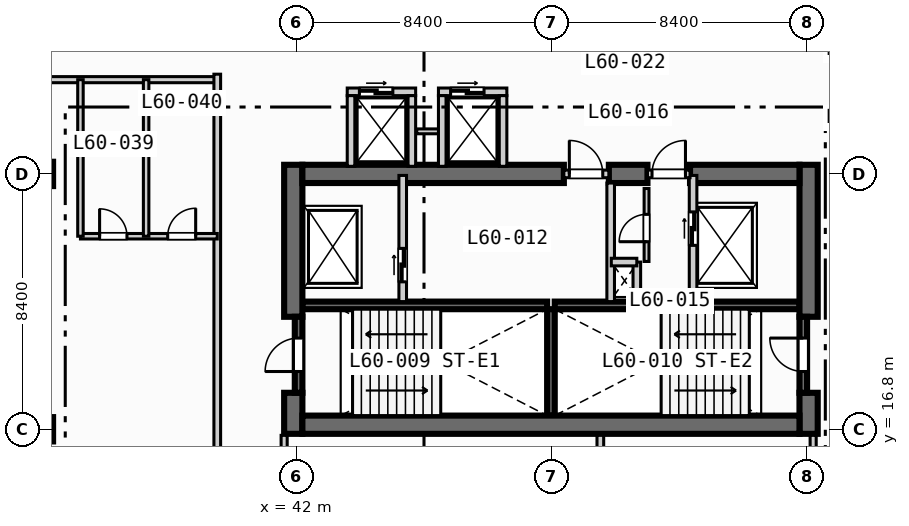
"""IFC4 building model, lengths in metres.
Left out: names, types, materials, properties, quantities, classifications, styles, units other than length and angle.
Written with IfcOpenShell. Run it as: python <this file> out.ifc"""

import sys

from ifc_helpers import new_model, si_unit, direction, frame, frame_2d, origin, origin_2d, place, context, subcontext, project, spatial, rectangle, extrude, element, fill, save


model = new_model("IFC4")
c1 = context("Model", 3, precision=1e-05, world=origin(), true_north=direction((0.0, 1.0)))
c2 = subcontext(c1, "Body", "Model", "MODEL_VIEW")
j1 = project(units=[si_unit("LENGTHUNIT", "METRE"), si_unit("PLANEANGLEUNIT", "RADIAN")], contexts=[c1])
p1 = place(None, origin())
s1 = spatial("IfcSite", under=j1, at=p1, CompositionType="ELEMENT")
p2 = place(p1, origin())
s2 = spatial("IfcBuilding", under=s1, at=p2, CompositionType="ELEMENT")
p3 = place(p2, frame((0.0, 0.0, 245.3)))
s3 = spatial("IfcBuildingStorey", under=s2, at=p3, CompositionType="ELEMENT", Elevation=245.3)
for number, where, z_axis, x_axis in (
    (1, (42.2, 20.875, 0.0), (0.0, 0.0, 1.0), (1.0, 0.0, 0.0)),
    (2, (50.5, 20.875, 0.0), (0.0, 0.0, 1.0), (1.0, 0.0, 0.0)),
):
    element("IfcWall", number, at=place(p3, frame(where, z_axis=z_axis, x_axis=x_axis)), inside=s3, PredefinedType="SOLIDWALL", context=c2, shape_type="SweptSolid", body=[
        extrude(rectangle(XDim=8.05, YDim=0.25, at=frame_2d((4.025, 0.0))), origin(), (0.0, 0.0, 1.0), 3.47),
    ])
p4 = place(p3, frame((50.375, 17.25, 0.0), z_axis=(0.0, 0.0, 1.0), x_axis=(0.0, 1.0, 0.0)))
e3 = element("IfcWall", 3, at=p4, inside=s3, PredefinedType="SOLIDWALL", context=c2, shape_type="SweptSolid", body=[
    extrude(rectangle(XDim=3.5, YDim=0.25, at=frame_2d((1.75, 0.0))), origin(), (0.0, 0.0, 1.0), 3.47),
])
p5 = place(p3, frame((41.9, 16.65, 0.0), z_axis=(0.0, 0.0, 1.0), x_axis=(0.0, 1.0, 0.0)))
e4 = element("IfcWall", 4, at=p5, inside=s3, PredefinedType="SHEAR", context=c2, shape_type="SweptSolid", body=[
    extrude(rectangle(XDim=1.35, YDim=0.6, at=frame_2d((0.675, 0.0))), origin(), (0.0, 0.0, 1.0), 3.47),
])
p6 = place(p3, frame((41.9, 20.5, 0.0), z_axis=(0.0, 0.0, 1.0), x_axis=(0.0, 1.0, 0.0)))
e5 = element("IfcWall", 5, at=p6, inside=s3, PredefinedType="SHEAR", context=c2, shape_type="SweptSolid", body=[
    extrude(rectangle(XDim=5.0, YDim=0.6, at=frame_2d((2.5, 0.0))), origin(), (0.0, 0.0, 1.0), 3.47),
])
p7 = place(p3, frame((58.85, 16.65, 0.0), z_axis=(0.0, 0.0, 1.0), x_axis=(0.0, 1.0, 0.0)))
e6 = element("IfcWall", 6, at=p7, inside=s3, PredefinedType="SHEAR", context=c2, shape_type="SweptSolid", body=[
    extrude(rectangle(XDim=1.35, YDim=0.6, at=frame_2d((0.675, 0.0))), origin(), (0.0, 0.0, 1.0), 3.47),
])
p8 = place(p3, frame((58.85, 20.5, 0.0), z_axis=(0.0, 0.0, 1.0), x_axis=(0.0, 1.0, 0.0)))
e7 = element("IfcWall", 7, at=p8, inside=s3, PredefinedType="SHEAR", context=c2, shape_type="SweptSolid", body=[
    extrude(rectangle(XDim=5.0, YDim=0.6, at=frame_2d((2.5, 0.0))), origin(), (0.0, 0.0, 1.0), 3.47),
])
p9 = place(p3, frame((42.2, 16.95, 0.0), z_axis=(0.0, 0.0, 1.0), x_axis=(1.0, 0.0, 0.0)))
e8 = element("IfcWall", 8, at=p9, inside=s3, PredefinedType="SHEAR", context=c2, shape_type="SweptSolid", body=[
    extrude(rectangle(XDim=16.35, YDim=0.6, at=frame_2d((8.175, 0.0))), origin(), (0.0, 0.0, 1.0), 3.47),
])
p10 = place(p3, frame((42.2, 25.2, 0.0), z_axis=(0.0, 0.0, 1.0), x_axis=(1.0, 0.0, 0.0)))
e9 = element("IfcWall", 9, at=p10, inside=s3, PredefinedType="SHEAR", context=c2, shape_type="SweptSolid", body=[
    extrude(rectangle(XDim=8.6, YDim=0.6, at=frame_2d((4.3, 0.0))), origin(), (0.0, 0.0, 1.0), 3.47),
])
p11 = place(p3, frame((52.28, 25.2, 0.0), z_axis=(0.0, 0.0, 1.0), x_axis=(1.0, 0.0, 0.0)))
e10 = element("IfcWall", 10, at=p11, inside=s3, PredefinedType="SHEAR", context=c2, shape_type="SweptSolid", body=[
    extrude(rectangle(XDim=1.27, YDim=0.6, at=frame_2d((0.635, 0.0))), origin(), (0.0, 0.0, 1.0), 3.47),
])
p12 = place(p3, frame((54.95, 25.2, 0.0), z_axis=(0.0, 0.0, 1.0), x_axis=(1.0, 0.0, 0.0)))
e11 = element("IfcWall", 11, at=p12, inside=s3, PredefinedType="SHEAR", context=c2, shape_type="SweptSolid", body=[
    extrude(rectangle(XDim=3.6, YDim=0.6, at=frame_2d((1.8, 0.0))), origin(), (0.0, 0.0, 1.0), 3.47),
])
for number, where, z_axis, x_axis in (
    (12, (33.6, 16.8, 0.0), (0.0, 0.0, 1.0), (1.0, 0.0, 0.0)),
    (13, (33.6, 25.2, 0.0), (0.0, 0.0, 1.0), (1.0, 0.0, 0.0)),
):
    element("IfcColumn", number, at=place(p3, frame(where, z_axis=z_axis, x_axis=x_axis)), inside=s3, PredefinedType="COLUMN", context=c2, shape_type="SweptSolid", body=[
        extrude(rectangle(XDim=0.8, YDim=0.8, at=origin_2d()), origin(), (0.0, 0.0, 1.0), 3.7),
    ])
p13 = place(p3, frame((42.075, 18.0, 0.0), z_axis=(0.0, 0.0, 1.0), x_axis=(0.0, 1.0, 0.0)))
e14 = element("IfcWall", 14, at=p13, inside=s3, PredefinedType="SOLIDWALL", context=c2, shape_type="SweptSolid", body=[
    extrude(rectangle(XDim=2.5, YDim=0.25, at=frame_2d((1.25, 0.0))), origin(), (0.0, 0.0, 1.0), 3.47),
])
p14 = place(p13, frame((0.7, 0.0, 0.0)))
e15 = element("IfcOpeningElement", 15, at=p14, cuts=e14, PredefinedType="OPENING", context=c2, shape_type="SweptSolid", body=[
    extrude(rectangle(XDim=1.1, YDim=2.15, at=frame_2d((0.55, 1.075))), frame((0.0, 0.135, 0.0), z_axis=(0.0, -1.0, 0.0), x_axis=(1.0, 0.0, 0.0)), (0.0, 0.0, 1.0), 0.27),
])
p15 = place(p3, frame((58.675, 18.0, 0.0), z_axis=(0.0, 0.0, 1.0), x_axis=(0.0, 1.0, 0.0)))
e16 = element("IfcWall", 16, at=p15, inside=s3, PredefinedType="SOLIDWALL", context=c2, shape_type="SweptSolid", body=[
    extrude(rectangle(XDim=2.5, YDim=0.25, at=frame_2d((1.25, 0.0))), origin(), (0.0, 0.0, 1.0), 3.47),
])
p16 = place(p15, frame((0.7, 0.0, 0.0)))
e17 = element("IfcOpeningElement", 17, at=p16, cuts=e16, PredefinedType="OPENING", context=c2, shape_type="SweptSolid", body=[
    extrude(rectangle(XDim=1.1, YDim=2.15, at=frame_2d((0.55, 1.075))), frame((0.0, 0.135, 0.0), z_axis=(0.0, -1.0, 0.0), x_axis=(1.0, 0.0, 0.0)), (0.0, 0.0, 1.0), 0.27),
])
p17 = place(p3, frame((45.5, 21.0, 0.0), z_axis=(0.0, 0.0, 1.0), x_axis=(0.0, 1.0, 0.0)))
e18 = element("IfcWall", 18, at=p17, inside=s3, PredefinedType="SOLIDWALL", context=c2, shape_type="SweptSolid", body=[
    extrude(rectangle(XDim=4.15, YDim=0.25, at=frame_2d((2.075, 0.0))), origin(), (0.0, 0.0, 1.0), 3.47),
])
p18 = place(p17, frame((0.65, 0.0, 0.0)))
e19 = element("IfcOpeningElement", 19, at=p18, cuts=e18, PredefinedType="OPENING", context=c2, shape_type="SweptSolid", body=[
    extrude(rectangle(XDim=1.1, YDim=2.15, at=frame_2d((0.55, 1.075))), frame((0.0, 0.135, 0.0), z_axis=(0.0, -1.0, 0.0), x_axis=(1.0, 0.0, 0.0)), (0.0, 0.0, 1.0), 0.27),
])
p19 = place(p3, frame((50.8, 25.2, 0.0), z_axis=(0.0, 0.0, 1.0), x_axis=(1.0, 0.0, 0.0)))
e20 = element("IfcWall", 20, at=p19, inside=s3, PredefinedType="SOLIDWALL", context=c2, shape_type="SweptSolid", body=[
    extrude(rectangle(XDim=1.48, YDim=0.25, at=frame_2d((0.74, 0.0))), origin(), (0.0, 0.0, 1.0), 3.47),
])
p20 = place(p19, frame((0.18, 0.0, 0.0)))
e21 = element("IfcOpeningElement", 21, at=p20, cuts=e20, PredefinedType="OPENING", context=c2, shape_type="SweptSolid", body=[
    extrude(rectangle(XDim=1.1, YDim=2.15, at=frame_2d((0.55, 1.075))), frame((0.0, 0.135, 0.0), z_axis=(0.0, -1.0, 0.0), x_axis=(1.0, 0.0, 0.0)), (0.0, 0.0, 1.0), 0.27),
])
p21 = place(p3, frame((52.34, 21.0, 0.0), z_axis=(0.0, 0.0, 1.0), x_axis=(0.0, 1.0, 0.0)))
e22 = element("IfcWall", 22, at=p21, inside=s3, PredefinedType="SOLIDWALL", context=c2, shape_type="SweptSolid", body=[
    extrude(rectangle(XDim=3.9, YDim=0.25, at=frame_2d((1.95, 0.0))), origin(), (0.0, 0.0, 1.0), 3.47),
])
p22 = place(p3, frame((55.05, 21.0, 0.0), z_axis=(0.0, 0.0, 1.0), x_axis=(0.0, 1.0, 0.0)))
e23 = element("IfcWall", 23, at=p22, inside=s3, PredefinedType="SOLIDWALL", context=c2, shape_type="SweptSolid", body=[
    extrude(rectangle(XDim=4.15, YDim=0.25, at=frame_2d((2.075, 0.0))), origin(), (0.0, 0.0, 1.0), 3.47),
])
p23 = place(p22, frame((1.85, 0.0, 0.0)))
e24 = element("IfcOpeningElement", 24, at=p23, cuts=e23, PredefinedType="OPENING", context=c2, shape_type="SweptSolid", body=[
    extrude(rectangle(XDim=1.1, YDim=2.15, at=frame_2d((0.55, 1.075))), frame((0.0, 0.135, 0.0), z_axis=(0.0, -1.0, 0.0), x_axis=(1.0, 0.0, 0.0)), (0.0, 0.0, 1.0), 0.27),
])
p24 = place(p3, frame((53.55, 25.2, 0.0), z_axis=(0.0, 0.0, 1.0), x_axis=(1.0, 0.0, 0.0)))
e25 = element("IfcWall", 25, at=p24, inside=s3, PredefinedType="SOLIDWALL", context=c2, shape_type="SweptSolid", body=[
    extrude(rectangle(XDim=1.4, YDim=0.25, at=frame_2d((0.7, 0.0))), origin(), (0.0, 0.0, 1.0), 3.47),
])
p25 = place(p24, frame((0.15, 0.0, 0.0)))
e26 = element("IfcOpeningElement", 26, at=p25, cuts=e25, PredefinedType="OPENING", context=c2, shape_type="SweptSolid", body=[
    extrude(rectangle(XDim=1.1, YDim=2.15, at=frame_2d((0.55, 1.075))), frame((0.0, 0.135, 0.0), z_axis=(0.0, -1.0, 0.0), x_axis=(1.0, 0.0, 0.0)), (0.0, 0.0, 1.0), 0.27),
])
p26 = place(p3, frame((53.2, 21.0, 0.0), z_axis=(0.0, 0.0, 1.0), x_axis=(0.0, 1.0, 0.0)))
e27 = element("IfcWall", 27, at=p26, inside=s3, PredefinedType="SOLIDWALL", context=c2, shape_type="SweptSolid", body=[
    extrude(rectangle(XDim=1.3, YDim=0.25, at=frame_2d((0.65, 0.0))), origin(), (0.0, 0.0, 1.0), 3.47),
])
p27 = place(p3, frame((52.36, 22.3, 0.0), z_axis=(0.0, 0.0, 1.0), x_axis=(1.0, 0.0, 0.0)))
e28 = element("IfcWall", 28, at=p27, inside=s3, PredefinedType="SOLIDWALL", context=c2, shape_type="SweptSolid", body=[
    extrude(rectangle(XDim=0.84, YDim=0.25, at=frame_2d((0.42, 0.0))), origin(), (0.0, 0.0, 1.0), 3.47),
])
p28 = place(p3, frame((53.52, 22.32, 0.0), z_axis=(0.0, 0.0, 1.0), x_axis=(0.0, 1.0, 0.0)))
e29 = element("IfcWall", 29, at=p28, inside=s3, PredefinedType="PARTITIONING", context=c2, shape_type="SweptSolid", body=[
    extrude(rectangle(XDim=2.4, YDim=0.16, at=frame_2d((1.2, 0.0))), origin(), (0.0, 0.0, 1.0), 3.47),
])
p29 = place(p28, frame((0.65, 0.0, 0.0)))
e30 = element("IfcOpeningElement", 30, at=p29, cuts=e29, PredefinedType="OPENING", context=c2, shape_type="SweptSolid", body=[
    extrude(rectangle(XDim=0.9, YDim=2.1, at=frame_2d((0.45, 1.05))), frame((0.0, 0.09, 0.0), z_axis=(0.0, -1.0, 0.0), x_axis=(1.0, 0.0, 0.0)), (0.0, 0.0, 1.0), 0.18),
])
p30 = place(p3, frame((43.675, 27.9, 0.0), z_axis=(0.0, 0.0, 1.0), x_axis=(1.0, 0.0, 0.0)))
e31 = element("IfcWall", 31, at=p30, inside=s3, PredefinedType="SOLIDWALL", context=c2, shape_type="SweptSolid", body=[
    extrude(rectangle(XDim=2.25, YDim=0.25, at=frame_2d((1.125, 0.0))), origin(), (0.0, 0.0, 1.0), 3.47),
])
p31 = place(p30, frame((0.4, 0.0, 0.0)))
e32 = element("IfcOpeningElement", 32, at=p31, cuts=e31, PredefinedType="OPENING", context=c2, shape_type="SweptSolid", body=[
    extrude(rectangle(XDim=1.1, YDim=2.15, at=frame_2d((0.55, 1.075))), frame((0.0, 0.135, 0.0), z_axis=(0.0, -1.0, 0.0), x_axis=(1.0, 0.0, 0.0)), (0.0, 0.0, 1.0), 0.27),
])
for number, where, z_axis, x_axis in (
    (33, (43.8, 25.45, 0.0), (0.0, 0.0, 1.0), (0.0, 1.0, 0.0)),
    (34, (45.8, 25.45, 0.0), (0.0, 0.0, 1.0), (0.0, 1.0, 0.0)),
):
    element("IfcWall", number, at=place(p3, frame(where, z_axis=z_axis, x_axis=x_axis)), inside=s3, PredefinedType="SOLIDWALL", context=c2, shape_type="SweptSolid", body=[
        extrude(rectangle(XDim=2.325, YDim=0.25, at=frame_2d((1.163, 0.0))), origin(), (0.0, 0.0, 1.0), 3.47),
    ])
p32 = place(p3, frame((45.96, 26.6, 0.0), z_axis=(0.0, 0.0, 1.0), x_axis=(1.0, 0.0, 0.0)))
e35 = element("IfcWall", 35, at=p32, inside=s3, PredefinedType="PARTITIONING", context=c2, shape_type="SweptSolid", body=[
    extrude(rectangle(XDim=0.88, YDim=0.16, at=frame_2d((0.44, 0.0))), origin(), (0.0, 0.0, 1.0), 3.47),
])
p33 = place(p3, frame((46.675, 27.9, 0.0), z_axis=(0.0, 0.0, 1.0), x_axis=(1.0, 0.0, 0.0)))
e36 = element("IfcWall", 36, at=p33, inside=s3, PredefinedType="SOLIDWALL", context=c2, shape_type="SweptSolid", body=[
    extrude(rectangle(XDim=2.25, YDim=0.25, at=frame_2d((1.125, 0.0))), origin(), (0.0, 0.0, 1.0), 3.47),
])
p34 = place(p33, frame((0.4, 0.0, 0.0)))
e37 = element("IfcOpeningElement", 37, at=p34, cuts=e36, PredefinedType="OPENING", context=c2, shape_type="SweptSolid", body=[
    extrude(rectangle(XDim=1.1, YDim=2.15, at=frame_2d((0.55, 1.075))), frame((0.0, 0.135, 0.0), z_axis=(0.0, -1.0, 0.0), x_axis=(1.0, 0.0, 0.0)), (0.0, 0.0, 1.0), 0.27),
])
for number, where, z_axis, x_axis in (
    (38, (46.8, 25.45, 0.0), (0.0, 0.0, 1.0), (0.0, 1.0, 0.0)),
    (39, (48.8, 25.45, 0.0), (0.0, 0.0, 1.0), (0.0, 1.0, 0.0)),
):
    element("IfcWall", number, at=place(p3, frame(where, z_axis=z_axis, x_axis=x_axis)), inside=s3, PredefinedType="SOLIDWALL", context=c2, shape_type="SweptSolid", body=[
        extrude(rectangle(XDim=2.325, YDim=0.25, at=frame_2d((1.163, 0.0))), origin(), (0.0, 0.0, 1.0), 3.47),
    ])
p35 = place(p3, frame((41.6, 8.65, 0.0), z_axis=(0.0, 0.0, 1.0), x_axis=(0.0, 1.0, 0.0)))
e40 = element("IfcWall", 40, at=p35, inside=s3, PredefinedType="PARTITIONING", context=c2, shape_type="SweptSolid", body=[
    extrude(rectangle(XDim=7.95, YDim=0.2, at=frame_2d((3.975, 0.0))), origin(), (0.0, 0.0, 1.0), 3.47),
])
p36 = place(p35, frame((2.2, 0.0, 0.0)))
e41 = element("IfcOpeningElement", 41, at=p36, cuts=e40, PredefinedType="OPENING", context=c2, shape_type="SweptSolid", body=[
    extrude(rectangle(XDim=0.92, YDim=2.1, at=frame_2d((0.46, 1.05))), frame((0.0, 0.11, 0.0), z_axis=(0.0, -1.0, 0.0), x_axis=(1.0, 0.0, 0.0)), (0.0, 0.0, 1.0), 0.22),
])
p37 = place(p3, frame((59.0, 8.65, 0.0), z_axis=(0.0, 0.0, 1.0), x_axis=(0.0, 1.0, 0.0)))
e42 = element("IfcWall", 42, at=p37, inside=s3, PredefinedType="PARTITIONING", context=c2, shape_type="SweptSolid", body=[
    extrude(rectangle(XDim=7.95, YDim=0.2, at=frame_2d((3.975, 0.0))), origin(), (0.0, 0.0, 1.0), 2.859),
])
p38 = place(p37, frame((2.2, 0.0, 0.0)))
e43 = element("IfcOpeningElement", 43, at=p38, cuts=e42, PredefinedType="OPENING", context=c2, shape_type="SweptSolid", body=[
    extrude(rectangle(XDim=0.92, YDim=2.1, at=frame_2d((0.46, 1.05))), frame((0.0, 0.11, 0.0), z_axis=(0.0, -1.0, 0.0), x_axis=(1.0, 0.0, 0.0)), (0.0, 0.0, 1.0), 0.22),
])
p39 = place(p3, frame((52.0, 8.65, 0.0), z_axis=(0.0, 0.0, 1.0), x_axis=(0.0, 1.0, 0.0)))
e44 = element("IfcWall", 44, at=p39, inside=s3, PredefinedType="PARTITIONING", context=c2, shape_type="SweptSolid", body=[
    extrude(rectangle(XDim=7.95, YDim=0.22, at=frame_2d((3.975, 0.0))), origin(), (0.0, 0.0, 1.0), 3.47),
])
p40 = place(p3, frame((11.8, 28.3, 0.0), z_axis=(0.0, 0.0, 1.0), x_axis=(1.0, 0.0, 0.0)))
e45 = element("IfcWall", 45, at=p40, inside=s3, PredefinedType="PARTITIONING", context=c2, shape_type="SweptSolid", body=[
    extrude(rectangle(XDim=27.6, YDim=0.2, at=frame_2d((13.8, 0.0))), origin(), (0.0, 0.0, 1.0), 3.47),
])
p41 = place(p40, frame((3.92, 0.0, 0.0)))
e46 = element("IfcOpeningElement", 46, at=p41, cuts=e45, PredefinedType="OPENING", context=c2, shape_type="SweptSolid", body=[
    extrude(rectangle(XDim=1.0, YDim=2.15, at=frame_2d((0.5, 1.075))), frame((0.0, 0.11, 0.0), z_axis=(0.0, -1.0, 0.0), x_axis=(1.0, 0.0, 0.0)), (0.0, 0.0, 1.0), 0.22),
])
p42 = place(p40, frame((12.57, 0.0, 0.0)))
e47 = element("IfcOpeningElement", 47, at=p42, cuts=e45, PredefinedType="OPENING", context=c2, shape_type="SweptSolid", body=[
    extrude(rectangle(XDim=1.0, YDim=2.15, at=frame_2d((0.5, 1.075))), frame((0.0, 0.11, 0.0), z_axis=(0.0, -1.0, 0.0), x_axis=(1.0, 0.0, 0.0)), (0.0, 0.0, 1.0), 0.22),
])
p43 = place(p40, frame((20.77, 0.0, 0.0)))
e48 = element("IfcOpeningElement", 48, at=p43, cuts=e45, PredefinedType="OPENING", context=c2, shape_type="SweptSolid", body=[
    extrude(rectangle(XDim=1.0, YDim=2.15, at=frame_2d((0.5, 1.075))), frame((0.0, 0.11, 0.0), z_axis=(0.0, -1.0, 0.0), x_axis=(1.0, 0.0, 0.0)), (0.0, 0.0, 1.0), 0.22),
])
p44 = place(p3, frame((39.4, 8.6, 0.0), z_axis=(0.0, 0.0, 1.0), x_axis=(0.0, 1.0, 0.0)))
e49 = element("IfcWall", 49, at=p44, inside=s3, PredefinedType="PARTITIONING", context=c2, shape_type="SweptSolid", body=[
    extrude(rectangle(XDim=19.88, YDim=0.22, at=frame_2d((9.94, 0.0))), origin(), (0.0, 0.0, 1.0), 3.47),
])
p45 = place(p3, frame((34.9, 23.15, 0.0), z_axis=(0.0, 0.0, 1.0), x_axis=(1.0, 0.0, 0.0)))
e50 = element("IfcWall", 50, at=p45, inside=s3, PredefinedType="PLUMBINGWALL", context=c2, shape_type="SweptSolid", body=[
    extrude(rectangle(XDim=4.5, YDim=0.18, at=frame_2d((2.25, 0.0))), origin(), (0.0, 0.0, 1.0), 3.47),
])
p46 = place(p45, frame((0.63, 0.0, 0.0)))
e51 = element("IfcOpeningElement", 51, at=p46, cuts=e50, PredefinedType="OPENING", context=c2, shape_type="SweptSolid", body=[
    extrude(rectangle(XDim=0.9, YDim=2.1, at=frame_2d((0.45, 1.05))), frame((0.0, 0.1, 0.0), z_axis=(0.0, -1.0, 0.0), x_axis=(1.0, 0.0, 0.0)), (0.0, 0.0, 1.0), 0.2),
])
p47 = place(p45, frame((2.87, 0.0, 0.0)))
e52 = element("IfcOpeningElement", 52, at=p47, cuts=e50, PredefinedType="OPENING", context=c2, shape_type="SweptSolid", body=[
    extrude(rectangle(XDim=0.92, YDim=2.1, at=frame_2d((0.46, 1.05))), frame((0.0, 0.1, 0.0), z_axis=(0.0, -1.0, 0.0), x_axis=(1.0, 0.0, 0.0)), (0.0, 0.0, 1.0), 0.2),
])
for number, where, z_axis, x_axis in (
    (53, (34.9, 23.15, 0.0), (0.0, 0.0, 1.0), (0.0, 1.0, 0.0)),
    (54, (37.06, 23.15, 0.0), (0.0, 0.0, 1.0), (0.0, 1.0, 0.0)),
):
    element("IfcWall", number, at=place(p3, frame(where, z_axis=z_axis, x_axis=x_axis)), inside=s3, PredefinedType="PLUMBINGWALL", context=c2, shape_type="SweptSolid", body=[
        extrude(rectangle(XDim=5.15, YDim=0.18, at=frame_2d((2.575, 0.0))), origin(), (0.0, 0.0, 1.0), 3.47),
    ])
p48 = place(p14, origin())
e55 = element("IfcDoor", 55, at=p48, inside=s3, OperationType="SINGLE_SWING_LEFT", PredefinedType="DOOR", context=c2, shape_type="SweptSolid", body=[
    extrude(rectangle(XDim=1.1, YDim=2.15, at=frame_2d((0.55, 1.075))), frame((0.0, 0.025, 0.0), z_axis=(0.0, -1.0, 0.0), x_axis=(1.0, 0.0, 0.0)), (0.0, 0.0, 1.0), 0.05),
])
fill(e15, e55)
p49 = place(p16, origin())
e56 = element("IfcDoor", 56, at=p49, inside=s3, OperationType="SINGLE_SWING_RIGHT", PredefinedType="DOOR", context=c2, shape_type="SweptSolid", body=[
    extrude(rectangle(XDim=1.1, YDim=2.15, at=frame_2d((0.55, 1.075))), frame((0.0, 0.025, 0.0), z_axis=(0.0, -1.0, 0.0), x_axis=(1.0, 0.0, 0.0)), (0.0, 0.0, 1.0), 0.05),
])
fill(e17, e56)
p50 = place(p18, origin())
e57 = element("IfcDoor", 57, at=p50, inside=s3, OperationType="SLIDING_TO_LEFT", PredefinedType="DOOR", context=c2, shape_type="SweptSolid", body=[
    extrude(rectangle(XDim=1.1, YDim=2.15, at=frame_2d((0.55, 1.075))), frame((0.0, 0.025, 0.0), z_axis=(0.0, -1.0, 0.0), x_axis=(1.0, 0.0, 0.0)), (0.0, 0.0, 1.0), 0.05),
])
fill(e19, e57)
p51 = place(p20, origin())
e58 = element("IfcDoor", 58, at=p51, inside=s3, OperationType="SINGLE_SWING_LEFT", PredefinedType="DOOR", context=c2, shape_type="SweptSolid", body=[
    extrude(rectangle(XDim=1.1, YDim=2.15, at=frame_2d((0.55, 1.075))), frame((0.0, 0.025, 0.0), z_axis=(0.0, -1.0, 0.0), x_axis=(1.0, 0.0, 0.0)), (0.0, 0.0, 1.0), 0.05),
])
fill(e21, e58)
p52 = place(p23, origin())
e59 = element("IfcDoor", 59, at=p52, inside=s3, OperationType="SLIDING_TO_LEFT", PredefinedType="DOOR", context=c2, shape_type="SweptSolid", body=[
    extrude(rectangle(XDim=1.1, YDim=2.15, at=frame_2d((0.55, 1.075))), frame((0.0, 0.025, 0.0), z_axis=(0.0, -1.0, 0.0), x_axis=(1.0, 0.0, 0.0)), (0.0, 0.0, 1.0), 0.05),
])
fill(e24, e59)
p53 = place(p25, origin())
e60 = element("IfcDoor", 60, at=p53, inside=s3, OperationType="SINGLE_SWING_RIGHT", PredefinedType="DOOR", context=c2, shape_type="SweptSolid", body=[
    extrude(rectangle(XDim=1.1, YDim=2.15, at=frame_2d((0.55, 1.075))), frame((0.0, 0.025, 0.0), z_axis=(0.0, -1.0, 0.0), x_axis=(1.0, 0.0, 0.0)), (0.0, 0.0, 1.0), 0.05),
])
fill(e26, e60)
p54 = place(p29, origin())
e61 = element("IfcDoor", 61, at=p54, inside=s3, OperationType="SINGLE_SWING_LEFT", PredefinedType="DOOR", context=c2, shape_type="SweptSolid", body=[
    extrude(rectangle(XDim=0.9, YDim=2.1, at=frame_2d((0.45, 1.05))), frame((0.0, 0.025, 0.0), z_axis=(0.0, -1.0, 0.0), x_axis=(1.0, 0.0, 0.0)), (0.0, 0.0, 1.0), 0.05),
])
fill(e30, e61)
p55 = place(p31, origin())
e62 = element("IfcDoor", 62, at=p55, inside=s3, OperationType="SLIDING_TO_LEFT", PredefinedType="DOOR", context=c2, shape_type="SweptSolid", body=[
    extrude(rectangle(XDim=1.1, YDim=2.15, at=frame_2d((0.55, 1.075))), frame((0.0, 0.025, 0.0), z_axis=(0.0, -1.0, 0.0), x_axis=(1.0, 0.0, 0.0)), (0.0, 0.0, 1.0), 0.05),
])
fill(e32, e62)
p56 = place(p34, origin())
e63 = element("IfcDoor", 63, at=p56, inside=s3, OperationType="SLIDING_TO_LEFT", PredefinedType="DOOR", context=c2, shape_type="SweptSolid", body=[
    extrude(rectangle(XDim=1.1, YDim=2.15, at=frame_2d((0.55, 1.075))), frame((0.0, 0.025, 0.0), z_axis=(0.0, -1.0, 0.0), x_axis=(1.0, 0.0, 0.0)), (0.0, 0.0, 1.0), 0.05),
])
fill(e37, e63)
p57 = place(p46, origin())
e64 = element("IfcDoor", 64, at=p57, inside=s3, OperationType="SINGLE_SWING_LEFT", PredefinedType="DOOR", context=c2, shape_type="SweptSolid", body=[
    extrude(rectangle(XDim=0.9, YDim=2.1, at=frame_2d((0.45, 1.05))), frame((0.0, 0.025, 0.0), z_axis=(0.0, -1.0, 0.0), x_axis=(1.0, 0.0, 0.0)), (0.0, 0.0, 1.0), 0.05),
])
fill(e51, e64)
p58 = place(p47, origin())
e65 = element("IfcDoor", 65, at=p58, inside=s3, OperationType="SINGLE_SWING_RIGHT", PredefinedType="DOOR", context=c2, shape_type="SweptSolid", body=[
    extrude(rectangle(XDim=0.92, YDim=2.1, at=frame_2d((0.46, 1.05))), frame((0.0, 0.025, 0.0), z_axis=(0.0, -1.0, 0.0), x_axis=(1.0, 0.0, 0.0)), (0.0, 0.0, 1.0), 0.05),
])
fill(e52, e65)
save(model, sys.argv[1])
